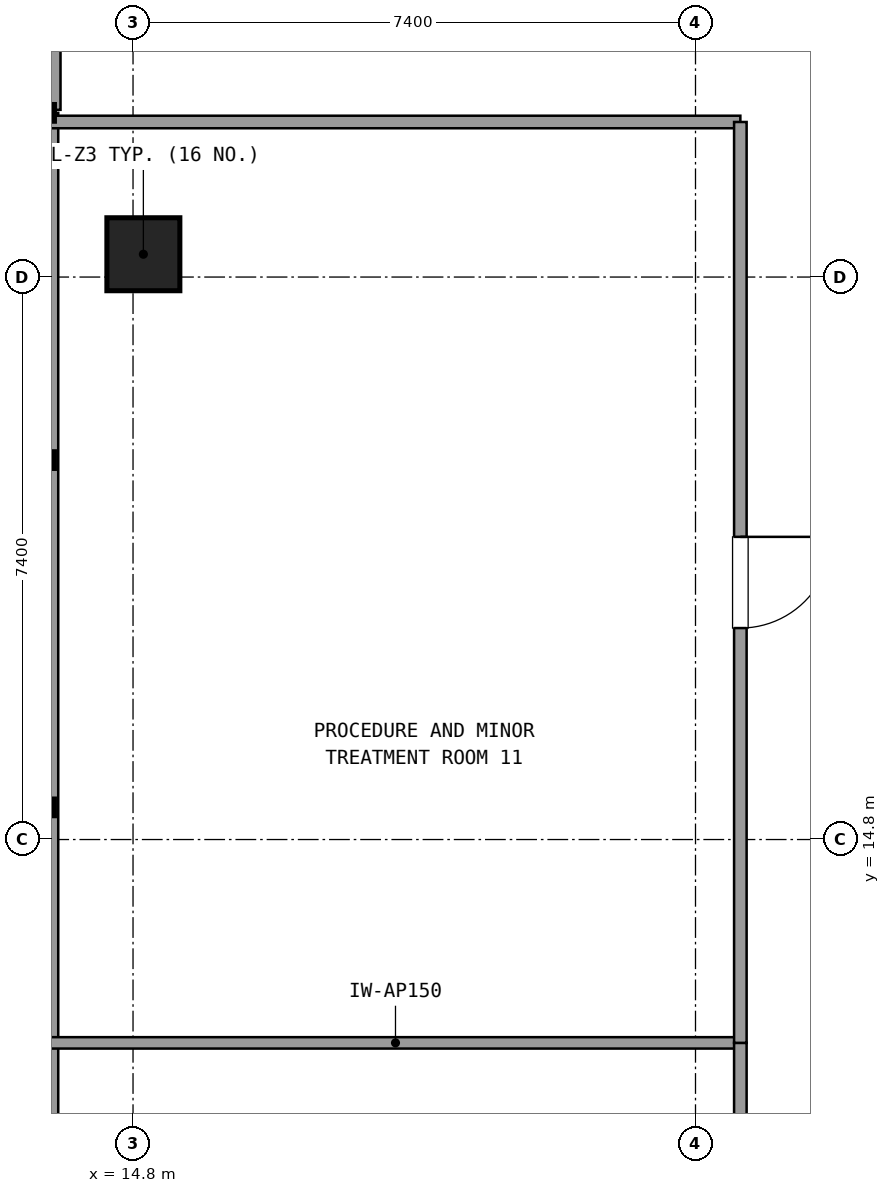
"""IFC4 building model, lengths in metres.
Left out: names, types, materials, properties, quantities, classifications, styles, units other than length and angle.
Written with IfcOpenShell. Run it as: python <this file> out.ifc"""

import sys

from ifc_helpers import new_model, si_unit, direction, frame, frame_2d, origin, origin_2d, place, context, subcontext, project, spatial, rectangle, extrude, element, fill, save


model = new_model("IFC4")
c1 = context("Model", 3, precision=1e-05, world=origin(), true_north=direction((0.0, 1.0)))
c2 = subcontext(c1, "Body", "Model", "MODEL_VIEW")
j1 = project(units=[si_unit("LENGTHUNIT", "METRE"), si_unit("PLANEANGLEUNIT", "RADIAN")], contexts=[c1])
p1 = place(None, origin())
s1 = spatial("IfcSite", under=j1, at=p1, CompositionType="ELEMENT")
p2 = place(p1, origin())
s2 = spatial("IfcBuilding", under=s1, at=p2, CompositionType="ELEMENT")
p3 = place(p2, frame((0.0, 0.0, 142.02)))
s3 = spatial("IfcBuildingStorey", under=s2, at=p3, CompositionType="ELEMENT", Elevation=142.02)
p4 = place(p3, frame((14.936, 22.5, 0.0), z_axis=(0.0, 0.0, 1.0), x_axis=(1.0, 0.0, 0.0)))
e1 = element("IfcColumn", 1, at=p4, inside=s3, PredefinedType="COLUMN", context=c2, shape_type="SweptSolid", body=[
    extrude(rectangle(XDim=0.96, YDim=0.96, at=origin_2d()), origin(), (0.0, 0.0, 1.0), 3.6),
])
p5 = place(p3, frame((13.696, 27.4, 0.0), z_axis=(0.0, 0.0, 1.0), x_axis=(0.0, -1.0, 0.0)))
e2 = element("IfcWall", 2, at=p5, inside=s3, PredefinedType="SOLIDWALL", context=c2, shape_type="SweptSolid", body=[
    extrude(rectangle(XDim=3.0, YDim=0.3, at=frame_2d((1.5, 0.0))), origin(), (0.0, 0.0, 1.0), 2.67),
])
p6 = place(p5, frame((0.9, 0.0, 0.0)))
e3 = element("IfcOpeningElement", 3, at=p6, cuts=e2, PredefinedType="OPENING", context=c2, shape_type="SweptSolid", body=[
    extrude(rectangle(XDim=1.2, YDim=2.2, at=frame_2d((0.6, 1.1))), frame((0.0, 0.16, 0.0), z_axis=(0.0, -1.0, 0.0), x_axis=(1.0, 0.0, 0.0)), (0.0, 0.0, 1.0), 0.32),
])
p7 = place(p3, frame((13.696, 24.36, 0.0), z_axis=(0.0, 0.0, 1.0), x_axis=(0.0, -1.0, 0.0)))
e4 = element("IfcWall", 4, at=p7, inside=s3, PredefinedType="SOLIDWALL", context=c2, shape_type="SweptSolid", body=[
    extrude(rectangle(XDim=13.705, YDim=0.24, at=frame_2d((6.853, 0.0))), origin(), (0.0, 0.0, 1.0), 0.85),
])
p8 = place(p3, frame((13.716, 24.24, 0.0), z_axis=(0.0, 0.0, 1.0), x_axis=(1.0, 0.0, 0.0)))
e5 = element("IfcWall", 5, at=p8, inside=s3, PredefinedType="PARTITIONING", context=c2, shape_type="SweptSolid", body=[
    extrude(rectangle(XDim=9.074, YDim=0.165, at=frame_2d((4.537, 0.0))), origin(), (0.0, 0.0, 1.0), 2.61),
])
p9 = place(p3, frame((22.79, 12.125, 0.0), z_axis=(0.0, 0.0, 1.0), x_axis=(-1.0, 0.0, 0.0)))
e6 = element("IfcWall", 6, at=p9, inside=s3, PredefinedType="PARTITIONING", context=c2, shape_type="SweptSolid", body=[
    extrude(rectangle(XDim=9.074, YDim=0.15, at=frame_2d((4.537, 0.0))), origin(), (0.0, 0.0, 1.0), 2.61),
])
p10 = place(p3, frame((22.79, 4.7, 0.0), z_axis=(0.0, 0.0, 1.0), x_axis=(0.0, 1.0, 0.0)))
e7 = element("IfcWall", 7, at=p10, inside=s3, PredefinedType="PARTITIONING", context=c2, shape_type="SweptSolid", body=[
    extrude(rectangle(XDim=7.425, YDim=0.165, at=frame_2d((3.712, 0.0))), origin(), (0.0, 0.0, 1.0), 2.61),
])
p11 = place(p10, frame((3.112, 0.0, 0.0)))
e8 = element("IfcOpeningElement", 8, at=p11, cuts=e7, PredefinedType="OPENING", context=c2, shape_type="SweptSolid", body=[
    extrude(rectangle(XDim=1.2, YDim=2.15, at=frame_2d((0.6, 1.075))), frame((0.0, 0.093, 0.0), z_axis=(0.0, -1.0, 0.0), x_axis=(1.0, 0.0, 0.0)), (0.0, 0.0, 1.0), 0.185),
])
p12 = place(p3, frame((22.79, 12.125, 0.0), z_axis=(0.0, 0.0, 1.0), x_axis=(0.0, 1.0, 0.0)))
e9 = element("IfcWall", 9, at=p12, inside=s3, PredefinedType="PARTITIONING", context=c2, shape_type="SweptSolid", body=[
    extrude(rectangle(XDim=12.115, YDim=0.165, at=frame_2d((6.058, 0.0))), origin(), (0.0, 0.0, 1.0), 2.61),
])
p13 = place(p12, frame((5.457, 0.0, 0.0)))
e10 = element("IfcOpeningElement", 10, at=p13, cuts=e9, PredefinedType="OPENING", context=c2, shape_type="SweptSolid", body=[
    extrude(rectangle(XDim=1.2, YDim=2.15, at=frame_2d((0.6, 1.075))), frame((0.0, 0.093, 0.0), z_axis=(0.0, -1.0, 0.0), x_axis=(1.0, 0.0, 0.0)), (0.0, 0.0, 1.0), 0.185),
])
p14 = place(p13, frame((1.2, 0.0, 0.0), z_axis=(0.0, 0.0, 1.0), x_axis=(-1.0, 0.0, 0.0)))
e11 = element("IfcDoor", 11, at=p14, inside=s3, OperationType="SINGLE_SWING_RIGHT", PredefinedType="DOOR", context=c2, shape_type="SweptSolid", body=[
    extrude(rectangle(XDim=1.2, YDim=2.15, at=frame_2d((0.6, 1.075))), frame((0.0, 0.025, 0.0), z_axis=(0.0, -1.0, 0.0), x_axis=(1.0, 0.0, 0.0)), (0.0, 0.0, 1.0), 0.05),
])
fill(e10, e11)
save(model, sys.argv[1])
